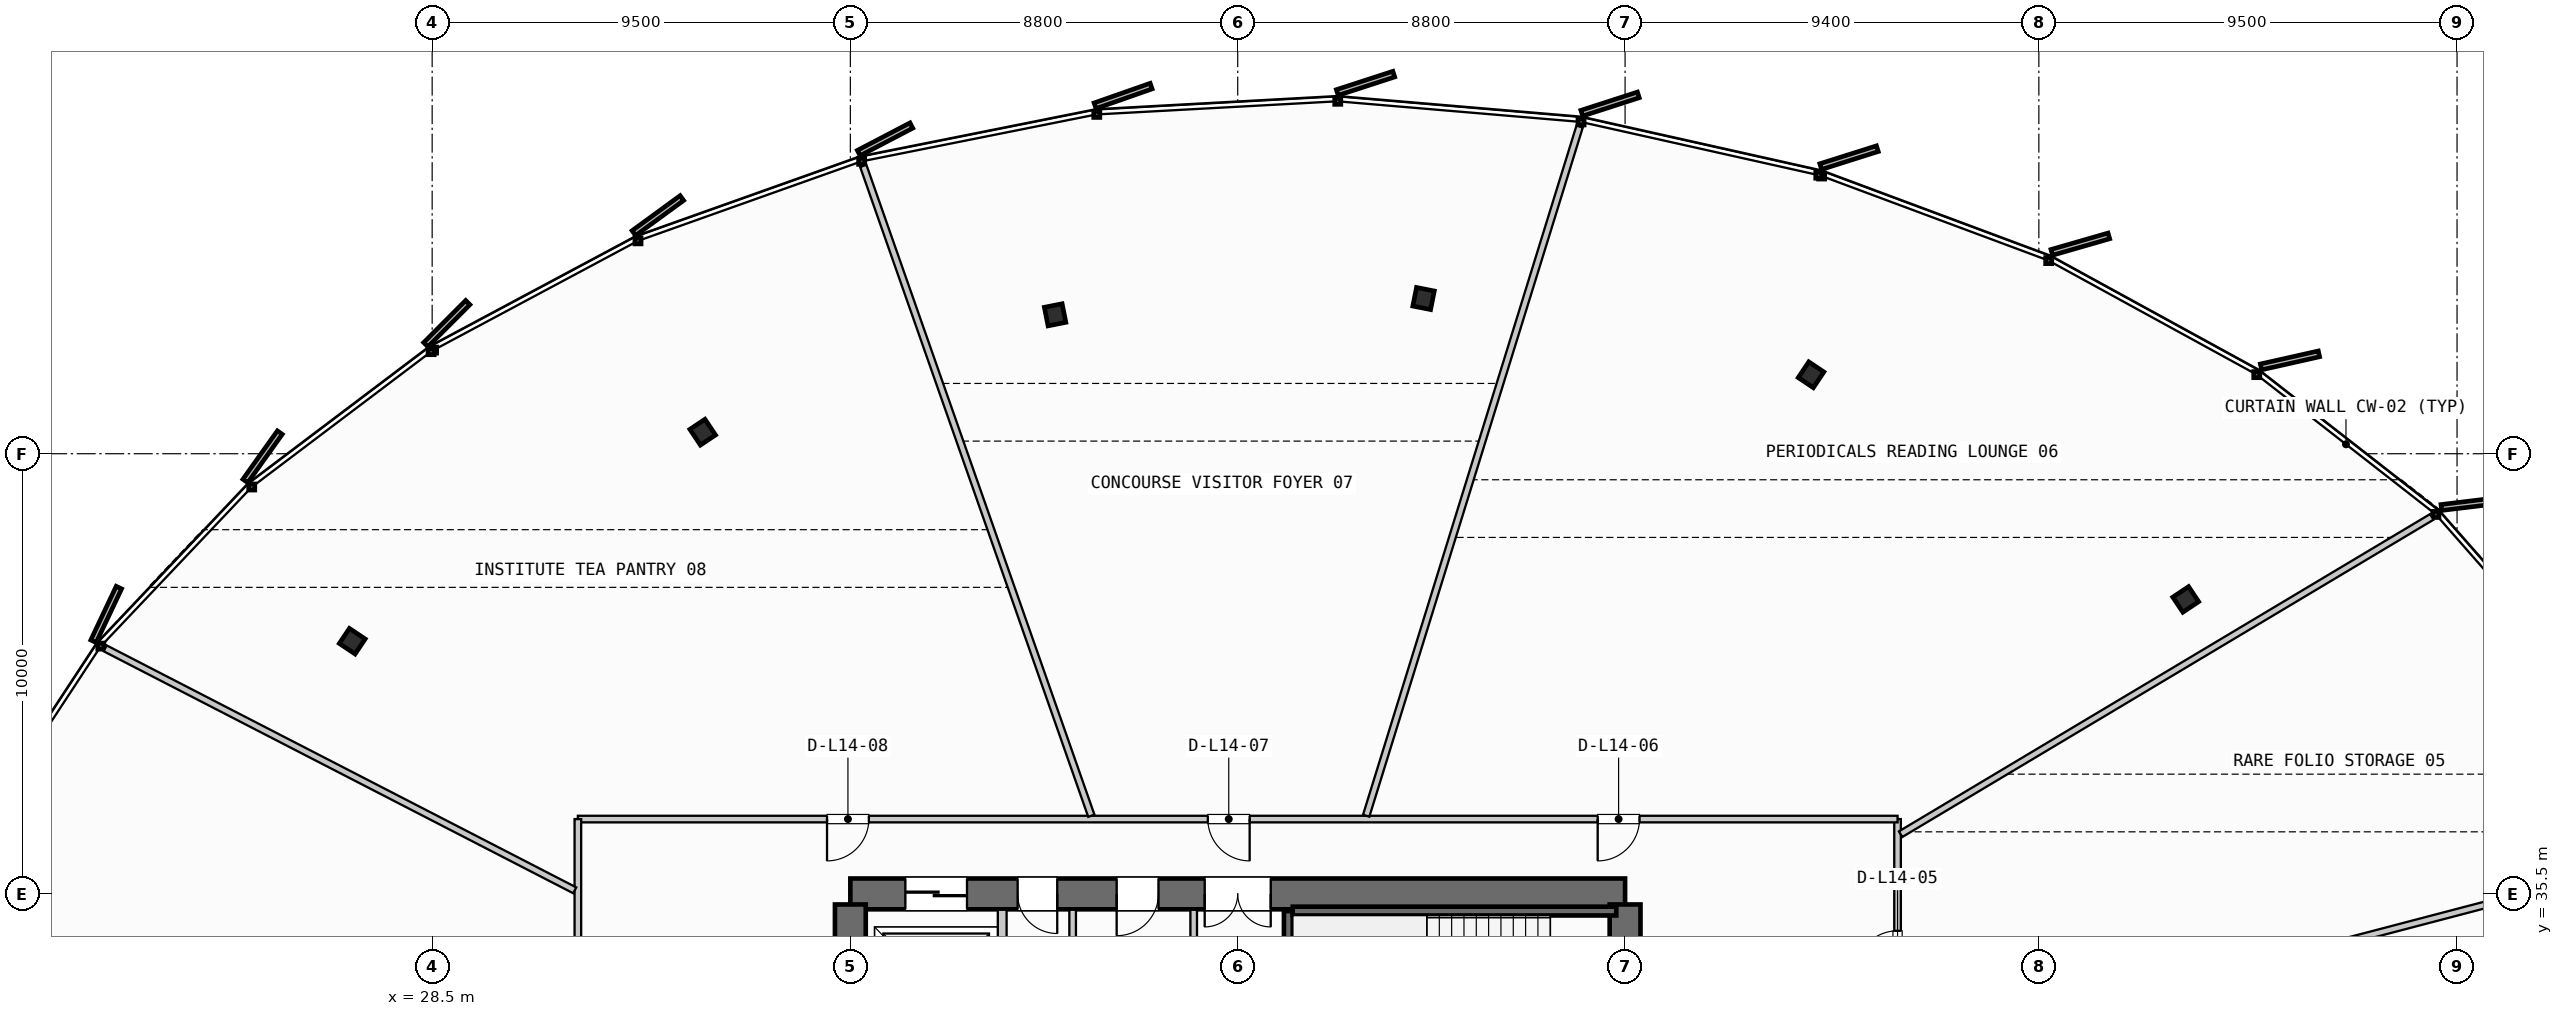
"""IFC4 building model, lengths in metres.
Left out: names, types, materials, properties, quantities, classifications, styles, units other than length and angle.
Written with IfcOpenShell. Run it as: python <this file> out.ifc"""

import sys

from ifc_helpers import new_model, si_unit, direction, frame, frame_2d, origin, origin_2d, place, context, subcontext, project, spatial, rectangle, i_section, extrude, source, transform, mapped, element, fill, save


model = new_model("IFC4")
c1 = context("Model", 3, precision=1e-05, world=origin(), true_north=direction((0.0, 1.0)))
c2 = subcontext(c1, "Body", "Model", "MODEL_VIEW")
j1 = project(units=[si_unit("LENGTHUNIT", "METRE"), si_unit("PLANEANGLEUNIT", "RADIAN")], contexts=[c1])
p1 = place(None, origin())
s1 = spatial("IfcSite", under=j1, at=p1, CompositionType="ELEMENT")
p2 = place(p1, origin())
s2 = spatial("IfcBuilding", under=s1, at=p2, CompositionType="ELEMENT")
p3 = place(p2, frame((0.0, 0.0, 60.0)))
s3 = spatial("IfcBuildingStorey", under=s2, at=p3, CompositionType="ELEMENT", Elevation=60.0)
p4 = place(p3, frame((55.6, 35.5, 0.0), z_axis=(0.0, 0.0, 1.0), x_axis=(-1.0, 0.0, 0.0)))
e1 = element("IfcWall", 1, at=p4, inside=s3, PredefinedType="SHEAR", context=c2, shape_type="SweptSolid", body=[
    extrude(rectangle(XDim=17.6, YDim=0.7, at=frame_2d((8.8, 0.0))), origin(), (0.0, 0.0, 1.0), 3.55),
])
p5 = place(p4, frame((8.05, 0.0, 0.0)))
e2 = element("IfcOpeningElement", 2, at=p5, cuts=e1, PredefinedType="OPENING", context=c2, shape_type="SweptSolid", body=[
    extrude(rectangle(XDim=1.5, YDim=2.2, at=frame_2d((0.75, 1.1))), frame((0.0, 0.36, 0.0), z_axis=(0.0, -1.0, 0.0), x_axis=(1.0, 0.0, 0.0)), (0.0, 0.0, 1.0), 0.72),
])
p6 = place(p4, frame((14.95, 0.0, 0.0)))
e3 = element("IfcOpeningElement", 3, at=p6, cuts=e1, PredefinedType="OPENING", context=c2, shape_type="SweptSolid", body=[
    extrude(rectangle(XDim=1.4, YDim=2.3, at=frame_2d((0.7, 1.15))), frame((0.0, 0.36, 0.0), z_axis=(0.0, -1.0, 0.0), x_axis=(1.0, 0.0, 0.0)), (0.0, 0.0, 1.0), 0.72),
])
p7 = place(p4, frame((12.9, 0.0, 0.0)))
e4 = element("IfcOpeningElement", 4, at=p7, cuts=e1, PredefinedType="OPENING", context=c2, shape_type="SweptSolid", body=[
    extrude(rectangle(XDim=0.9, YDim=2.15, at=frame_2d((0.45, 1.075))), frame((0.0, 0.36, 0.0), z_axis=(0.0, -1.0, 0.0), x_axis=(1.0, 0.0, 0.0)), (0.0, 0.0, 1.0), 0.72),
])
p8 = place(p4, frame((10.6, 0.0, 0.0)))
e5 = element("IfcOpeningElement", 5, at=p8, cuts=e1, PredefinedType="OPENING", context=c2, shape_type="SweptSolid", body=[
    extrude(rectangle(XDim=0.95, YDim=2.15, at=frame_2d((0.475, 1.075))), frame((0.0, 0.36, 0.0), z_axis=(0.0, -1.0, 0.0), x_axis=(1.0, 0.0, 0.0)), (0.0, 0.0, 1.0), 0.72),
])
p9 = place(p3, frame((38.0, 35.26, 0.0), z_axis=(0.0, 0.0, 1.0), x_axis=(0.0, -1.0, 0.0)))
e6 = element("IfcWall", 6, at=p9, inside=s3, PredefinedType="SHEAR", context=c2, shape_type="SweptSolid", body=[
    extrude(rectangle(XDim=14.92, YDim=0.7, at=frame_2d((7.46, 0.0))), origin(), (0.0, 0.0, 1.0), 3.55),
])
p10 = place(p9, frame((5.21, 0.0, 0.0)))
e7 = element("IfcOpeningElement", 7, at=p10, cuts=e6, PredefinedType="OPENING", context=c2, shape_type="SweptSolid", body=[
    extrude(rectangle(XDim=1.1, YDim=2.2, at=frame_2d((0.55, 1.1))), frame((0.0, 0.36, 0.0), z_axis=(0.0, -1.0, 0.0), x_axis=(1.0, 0.0, 0.0)), (0.0, 0.0, 1.0), 0.72),
])
p11 = place(p3, frame((55.6, 20.34, 0.0), z_axis=(0.0, 0.0, 1.0), x_axis=(0.0, 1.0, 0.0)))
e8 = element("IfcWall", 8, at=p11, inside=s3, PredefinedType="SHEAR", context=c2, shape_type="SweptSolid", body=[
    extrude(rectangle(XDim=14.92, YDim=0.7, at=frame_2d((7.46, 0.0))), origin(), (0.0, 0.0, 1.0), 3.55),
])
p12 = place(p11, frame((12.71, 0.0, 0.0)))
e9 = element("IfcOpeningElement", 9, at=p12, cuts=e8, PredefinedType="OPENING", context=c2, shape_type="SweptSolid", body=[
    extrude(rectangle(XDim=1.05, YDim=2.15, at=frame_2d((0.525, 1.075))), frame((0.0, 0.36, 0.0), z_axis=(0.0, -1.0, 0.0), x_axis=(1.0, 0.0, 0.0)), (0.0, 0.0, 1.0), 0.72),
])
p13 = place(p11, frame((8.61, 0.0, 0.0)))
e10 = element("IfcOpeningElement", 10, at=p13, cuts=e8, PredefinedType="OPENING", context=c2, shape_type="SweptSolid", body=[
    extrude(rectangle(XDim=1.1, YDim=2.2, at=frame_2d((0.55, 1.1))), frame((0.0, 0.36, 0.0), z_axis=(0.0, -1.0, 0.0), x_axis=(1.0, 0.0, 0.0)), (0.0, 0.0, 1.0), 0.72),
])
m1 = source(origin(), c2, "Body", "SweptSolid", [
    extrude(i_section(OverallWidth=0.412, OverallDepth=0.431, WebThickness=0.042, FlangeThickness=0.068, FilletRadius=0.015, at=origin_2d()), origin(), (0.0, 0.0, 1.0), 3.55),
])
for number, where, z_axis, x_axis in (
    (11, (68.336, 42.19, 0.0), (0.0, 0.0, 1.0), (0.831, 0.556, 0.0)),
    (12, (59.825, 47.293, 0.0), (0.0, 0.0, 1.0), (0.556, 0.831, 0.0)),
    (13, (51.022, 49.026, 0.0), (0.0, 0.0, 1.0), (0.195, 0.981, 0.0)),
    (14, (42.652, 48.656, 0.0), (0.0, 0.0, 1.0), (-0.195, 0.981, 0.0)),
    (15, (34.646, 45.99, 0.0), (0.0, 0.0, 1.0), (-0.556, 0.831, 0.0)),
    (16, (26.685, 41.241, 0.0), (0.0, 0.0, 1.0), (-0.831, 0.556, 0.0)),
):
    element("IfcColumn", number, at=place(p3, frame(where, z_axis=z_axis, x_axis=x_axis)), inside=s3, PredefinedType="COLUMN", context=c2, shape_type="MappedRepresentation", body=[
        mapped(m1, transform((0.0, 0.0, 0.0), scale=1.0)),
    ])
p14 = place(p3, frame((47.95, 32.05, 0.0), z_axis=(0.0, 0.0, 1.0), x_axis=(0.0, 1.0, 0.0)))
e17 = element("IfcWall", 17, at=p14, inside=s3, PredefinedType="SHEAR", context=c2, shape_type="SweptSolid", body=[
    extrude(rectangle(XDim=3.06, YDim=0.2, at=frame_2d((1.53, 0.0))), origin(), (0.0, 0.0, 1.0), 3.55),
])
p15 = place(p3, frame((48.05, 35.11, 0.0), z_axis=(0.0, 0.0, 1.0), x_axis=(1.0, 0.0, 0.0)))
e18 = element("IfcWall", 18, at=p15, inside=s3, PredefinedType="SHEAR", context=c2, shape_type="SweptSolid", body=[
    extrude(rectangle(XDim=7.35, YDim=0.2, at=frame_2d((3.675, 0.0))), origin(), (0.0, 0.0, 1.0), 3.55),
])
p16 = place(p3, frame((41.45, 31.85, 0.0), z_axis=(0.0, 0.0, 1.0), x_axis=(0.0, 1.0, 0.0)))
e19 = element("IfcWall", 19, at=p16, inside=s3, PredefinedType="PARTITIONING", context=c2, shape_type="SweptSolid", body=[
    extrude(rectangle(XDim=3.29, YDim=0.2, at=frame_2d((1.645, 0.0))), origin(), (0.0, 0.0, 1.0), 2.645),
])
p17 = place(p3, frame((45.8, 31.85, 0.0), z_axis=(0.0, 0.0, 1.0), x_axis=(0.0, 1.0, 0.0)))
e20 = element("IfcWall", 20, at=p17, inside=s3, PredefinedType="PARTITIONING", context=c2, shape_type="SweptSolid", body=[
    extrude(rectangle(XDim=3.29, YDim=0.15, at=frame_2d((1.645, 0.0))), origin(), (0.0, 0.0, 1.0), 2.645),
])
p18 = place(p3, frame((43.05, 31.85, 0.0), z_axis=(0.0, 0.0, 1.0), x_axis=(0.0, 1.0, 0.0)))
e21 = element("IfcWall", 21, at=p18, inside=s3, PredefinedType="PLUMBINGWALL", context=c2, shape_type="SweptSolid", body=[
    extrude(rectangle(XDim=3.29, YDim=0.15, at=frame_2d((1.645, 0.0))), origin(), (0.0, 0.0, 1.0), 2.645),
])
p19 = place(p3, frame((61.79, 17.98, 0.0), z_axis=(0.0, 0.0, 1.0), x_axis=(0.0, 1.0, 0.0)))
e22 = element("IfcWall", 22, at=p19, inside=s3, PredefinedType="PARTITIONING", context=c2, shape_type="SweptSolid", body=[
    extrude(rectangle(XDim=19.22, YDim=0.15, at=frame_2d((9.61, 0.0))), origin(), (0.0, 0.0, 1.0), 2.645),
])
p20 = place(p19, frame((2.487, 0.0, 0.0)))
e23 = element("IfcOpeningElement", 23, at=p20, cuts=e22, PredefinedType="OPENING", context=c2, shape_type="SweptSolid", body=[
    extrude(rectangle(XDim=0.95, YDim=2.15, at=frame_2d((0.475, 1.075))), frame((0.0, 0.085, 0.0), z_axis=(0.0, -1.0, 0.0), x_axis=(1.0, 0.0, 0.0)), (0.0, 0.0, 1.0), 0.17),
])
p21 = place(p19, frame((9.083, 0.0, 0.0)))
e24 = element("IfcOpeningElement", 24, at=p21, cuts=e22, PredefinedType="OPENING", context=c2, shape_type="SweptSolid", body=[
    extrude(rectangle(XDim=0.95, YDim=2.15, at=frame_2d((0.475, 1.075))), frame((0.0, 0.085, 0.0), z_axis=(0.0, -1.0, 0.0), x_axis=(1.0, 0.0, 0.0)), (0.0, 0.0, 1.0), 0.17),
])
p22 = place(p19, frame((15.732, 0.0, 0.0)))
e25 = element("IfcOpeningElement", 25, at=p22, cuts=e22, PredefinedType="OPENING", context=c2, shape_type="SweptSolid", body=[
    extrude(rectangle(XDim=0.95, YDim=2.15, at=frame_2d((0.475, 1.075))), frame((0.0, 0.085, 0.0), z_axis=(0.0, -1.0, 0.0), x_axis=(1.0, 0.0, 0.0)), (0.0, 0.0, 1.0), 0.17),
])
p23 = place(p3, frame((61.79, 37.2, 0.0), z_axis=(0.0, 0.0, 1.0), x_axis=(-1.0, 0.0, 0.0)))
e26 = element("IfcWall", 26, at=p23, inside=s3, PredefinedType="PARTITIONING", context=c2, shape_type="SweptSolid", body=[
    extrude(rectangle(XDim=29.98, YDim=0.15, at=frame_2d((14.99, 0.0))), origin(), (0.0, 0.0, 1.0), 2.645),
])
p24 = place(p23, frame((5.862, 0.0, 0.0)))
e27 = element("IfcOpeningElement", 27, at=p24, cuts=e26, PredefinedType="OPENING", context=c2, shape_type="SweptSolid", body=[
    extrude(rectangle(XDim=0.95, YDim=2.15, at=frame_2d((0.475, 1.075))), frame((0.0, 0.085, 0.0), z_axis=(0.0, -1.0, 0.0), x_axis=(1.0, 0.0, 0.0)), (0.0, 0.0, 1.0), 0.17),
])
p25 = place(p23, frame((14.719, 0.0, 0.0)))
e28 = element("IfcOpeningElement", 28, at=p25, cuts=e26, PredefinedType="OPENING", context=c2, shape_type="SweptSolid", body=[
    extrude(rectangle(XDim=0.95, YDim=2.15, at=frame_2d((0.475, 1.075))), frame((0.0, 0.085, 0.0), z_axis=(0.0, -1.0, 0.0), x_axis=(1.0, 0.0, 0.0)), (0.0, 0.0, 1.0), 0.17),
])
p26 = place(p23, frame((23.37, 0.0, 0.0)))
e29 = element("IfcOpeningElement", 29, at=p26, cuts=e26, PredefinedType="OPENING", context=c2, shape_type="SweptSolid", body=[
    extrude(rectangle(XDim=0.95, YDim=2.15, at=frame_2d((0.475, 1.075))), frame((0.0, 0.085, 0.0), z_axis=(0.0, -1.0, 0.0), x_axis=(1.0, 0.0, 0.0)), (0.0, 0.0, 1.0), 0.17),
])
p27 = place(p3, frame((31.81, 37.2, 0.0), z_axis=(0.0, 0.0, 1.0), x_axis=(0.0, -1.0, 0.0)))
e30 = element("IfcWall", 30, at=p27, inside=s3, PredefinedType="PARTITIONING", context=c2, shape_type="SweptSolid", body=[
    extrude(rectangle(XDim=19.22, YDim=0.15, at=frame_2d((9.61, 0.0))), origin(), (0.0, 0.0, 1.0), 2.645),
])
p28 = place(p27, frame((4.901, 0.0, 0.0)))
e31 = element("IfcOpeningElement", 31, at=p28, cuts=e30, PredefinedType="OPENING", context=c2, shape_type="SweptSolid", body=[
    extrude(rectangle(XDim=0.95, YDim=2.15, at=frame_2d((0.475, 1.075))), frame((0.0, 0.085, 0.0), z_axis=(0.0, -1.0, 0.0), x_axis=(1.0, 0.0, 0.0)), (0.0, 0.0, 1.0), 0.17),
])
p29 = place(p27, frame((13.411, 0.0, 0.0)))
e32 = element("IfcOpeningElement", 32, at=p29, cuts=e30, PredefinedType="OPENING", context=c2, shape_type="SweptSolid", body=[
    extrude(rectangle(XDim=0.95, YDim=2.15, at=frame_2d((0.475, 1.075))), frame((0.0, 0.085, 0.0), z_axis=(0.0, -1.0, 0.0), x_axis=(1.0, 0.0, 0.0)), (0.0, 0.0, 1.0), 0.17),
])
p30 = place(p3, frame((61.867, 31.773, 0.0), z_axis=(0.0, 0.0, 1.0), x_axis=(0.96734528528, 0.253462224103, 0.0)))
e33 = element("IfcWall", 33, at=p30, inside=s3, PredefinedType="PARTITIONING", context=c2, shape_type="SweptSolid", body=[
    extrude(rectangle(XDim=18.091, YDim=0.15, at=frame_2d((9.046, 0.0))), origin(), (0.0, 0.0, 1.0), 2.645),
])
p31 = place(p3, frame((61.859, 36.856, 0.0), z_axis=(0.0, 0.0, 1.0), x_axis=(0.858502804346, 0.512808867834, 0.0)))
e34 = element("IfcWall", 34, at=p31, inside=s3, PredefinedType="PARTITIONING", context=c2, shape_type="SweptSolid", body=[
    extrude(rectangle(XDim=14.055, YDim=0.15, at=frame_2d((7.028, 0.0))), origin(), (0.0, 0.0, 1.0), 2.645),
])
p32 = place(p3, frame((49.719, 37.276, 0.0), z_axis=(0.0, 0.0, 1.0), x_axis=(0.295808335605, 0.955247312787, 0.0)))
e35 = element("IfcWall", 35, at=p32, inside=s3, PredefinedType="PARTITIONING", context=c2, shape_type="SweptSolid", body=[
    extrude(rectangle(XDim=16.389, YDim=0.15, at=frame_2d((8.195, 0.0))), origin(), (0.0, 0.0, 1.0), 2.645),
])
p33 = place(p3, frame((43.475, 37.275, 0.0), z_axis=(0.0, 0.0, 1.0), x_axis=(-0.331121104833, 0.943588265047, 0.0)))
e36 = element("IfcWall", 36, at=p33, inside=s3, PredefinedType="PARTITIONING", context=c2, shape_type="SweptSolid", body=[
    extrude(rectangle(XDim=15.646, YDim=0.15, at=frame_2d((7.823, 0.0))), origin(), (0.0, 0.0, 1.0), 2.645),
])
p34 = place(p3, frame((31.739, 35.581, 0.0), z_axis=(0.0, 0.0, 1.0), x_axis=(-0.888912808973, 0.458076432535, 0.0)))
e37 = element("IfcWall", 37, at=p34, inside=s3, PredefinedType="PARTITIONING", context=c2, shape_type="SweptSolid", body=[
    extrude(rectangle(XDim=12.001, YDim=0.15, at=frame_2d((6.0, 0.0))), origin(), (0.0, 0.0, 1.0), 2.645),
])
m2 = source(origin(), c2, "Body", "SweptSolid", [
    extrude(rectangle(XDim=1.5, YDim=2.2, at=frame_2d((0.75, 1.1))), frame((0.0, 0.025, 0.0), z_axis=(0.0, -1.0, 0.0), x_axis=(1.0, 0.0, 0.0)), (0.0, 0.0, 1.0), 0.05),
])
p35 = place(p5, origin())
e38 = element("IfcDoor", 38, at=p35, inside=s3, OperationType="DOUBLE_DOOR_SINGLE_SWING", PredefinedType="DOOR", context=c2, shape_type="MappedRepresentation", body=[
    mapped(m2, transform((0.0, 0.0, 0.0), scale=1.0)),
])
fill(e2, e38)
m3 = source(origin(), c2, "Body", "SweptSolid", [
    extrude(rectangle(XDim=1.4, YDim=2.3, at=frame_2d((0.7, 1.15))), frame((0.0, 0.025, 0.0), z_axis=(0.0, -1.0, 0.0), x_axis=(1.0, 0.0, 0.0)), (0.0, 0.0, 1.0), 0.05),
])
p36 = place(p6, origin())
e39 = element("IfcDoor", 39, at=p36, inside=s3, OperationType="SLIDING_TO_RIGHT", PredefinedType="DOOR", context=c2, shape_type="MappedRepresentation", body=[
    mapped(m3, transform((0.0, 0.0, 0.0), scale=1.0)),
])
fill(e3, e39)
m4 = source(origin(), c2, "Body", "SweptSolid", [
    extrude(rectangle(XDim=0.9, YDim=2.15, at=frame_2d((0.45, 1.075))), frame((0.0, 0.025, 0.0), z_axis=(0.0, -1.0, 0.0), x_axis=(1.0, 0.0, 0.0)), (0.0, 0.0, 1.0), 0.05),
])
p37 = place(p7, origin())
e40 = element("IfcDoor", 40, at=p37, inside=s3, OperationType="SINGLE_SWING_LEFT", PredefinedType="DOOR", context=c2, shape_type="MappedRepresentation", body=[
    mapped(m4, transform((0.0, 0.0, 0.0), scale=1.0)),
])
fill(e4, e40)
m5 = source(origin(), c2, "Body", "SweptSolid", [
    extrude(rectangle(XDim=0.95, YDim=2.15, at=frame_2d((0.475, 1.075))), frame((0.0, 0.025, 0.0), z_axis=(0.0, -1.0, 0.0), x_axis=(1.0, 0.0, 0.0)), (0.0, 0.0, 1.0), 0.05),
])
p38 = place(p8, origin())
e41 = element("IfcDoor", 41, at=p38, inside=s3, OperationType="SINGLE_SWING_RIGHT", PredefinedType="DOOR", context=c2, shape_type="MappedRepresentation", body=[
    mapped(m5, transform((0.0, 0.0, 0.0), scale=1.0)),
])
fill(e5, e41)
p39 = place(p22, origin())
e42 = element("IfcDoor", 42, at=p39, inside=s3, OperationType="SINGLE_SWING_LEFT", PredefinedType="DOOR", context=c2, shape_type="MappedRepresentation", body=[
    mapped(m5, transform((0.0, 0.0, 0.0), scale=1.0)),
])
fill(e25, e42)
p40 = place(p24, origin())
e43 = element("IfcDoor", 43, at=p40, inside=s3, OperationType="SINGLE_SWING_RIGHT", PredefinedType="DOOR", context=c2, shape_type="MappedRepresentation", body=[
    mapped(m5, transform((0.0, 0.0, 0.0), scale=1.0)),
])
fill(e27, e43)
p41 = place(p25, origin())
e44 = element("IfcDoor", 44, at=p41, inside=s3, OperationType="SINGLE_SWING_LEFT", PredefinedType="DOOR", context=c2, shape_type="MappedRepresentation", body=[
    mapped(m5, transform((0.0, 0.0, 0.0), scale=1.0)),
])
fill(e28, e44)
p42 = place(p26, origin())
e45 = element("IfcDoor", 45, at=p42, inside=s3, OperationType="SINGLE_SWING_RIGHT", PredefinedType="DOOR", context=c2, shape_type="MappedRepresentation", body=[
    mapped(m5, transform((0.0, 0.0, 0.0), scale=1.0)),
])
fill(e29, e45)
save(model, sys.argv[1])
